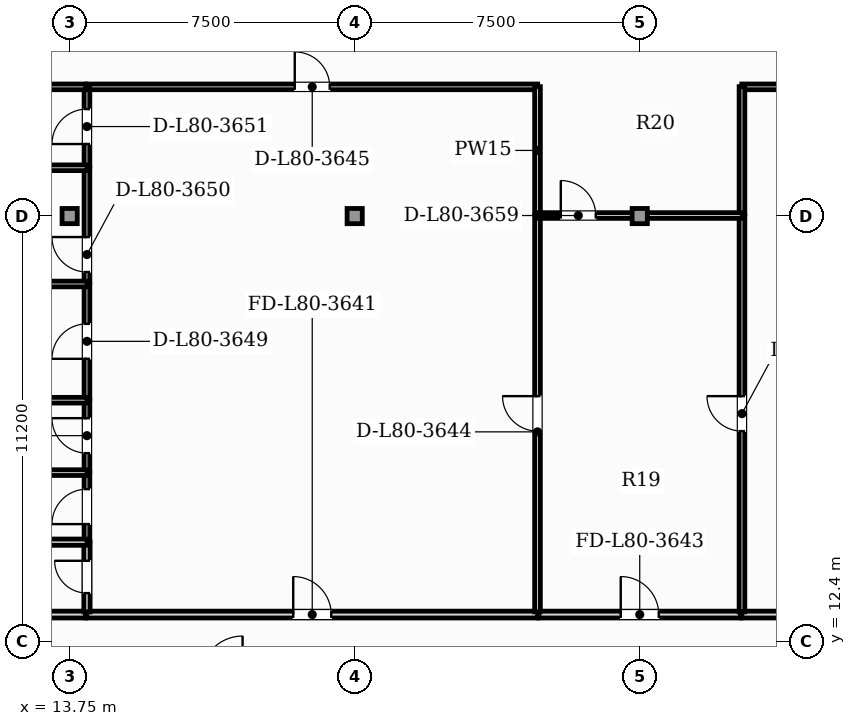
"""IFC4 building model, lengths in metres.
Left out: names, types, materials, properties, quantities, classifications, styles, units other than length and angle.
Written with IfcOpenShell. Run it as: python <this file> out.ifc"""

import sys

from ifc_helpers import new_model, si_unit, direction, frame, frame_2d, origin, origin_2d, place, context, subcontext, project, spatial, rectangle, hollow_rectangle, extrude, element, fill, save


model = new_model("IFC4")
c1 = context("Model", 3, precision=1e-05, world=origin(), true_north=direction((0.0, 1.0)))
c2 = subcontext(c1, "Body", "Model", "MODEL_VIEW")
j1 = project(units=[si_unit("LENGTHUNIT", "METRE"), si_unit("PLANEANGLEUNIT", "RADIAN")], contexts=[c1])
p1 = place(None, origin())
s1 = spatial("IfcSite", under=j1, at=p1, CompositionType="ELEMENT")
p2 = place(p1, origin())
s2 = spatial("IfcBuilding", under=s1, at=p2, CompositionType="ELEMENT")
p3 = place(p2, frame((0.0, 0.0, 324.6)))
s3 = spatial("IfcBuildingStorey", under=s2, at=p3, CompositionType="ELEMENT", Elevation=324.6)
for number, where, z_axis, x_axis in (
    (1, (13.75, 23.6, 0.0), (0.0, 0.0, 1.0), (1.0, 0.0, 0.0)),
    (2, (21.25, 23.6, 0.0), (0.0, 0.0, 1.0), (1.0, 0.0, 0.0)),
    (3, (28.75, 23.6, 0.0), (0.0, 0.0, 1.0), (1.0, 0.0, 0.0)),
):
    element("IfcColumn", number, at=place(p3, frame(where, z_axis=z_axis, x_axis=x_axis)), inside=s3, PredefinedType="COLUMN", context=c2, shape_type="SweptSolid", body=[
        extrude(hollow_rectangle(XDim=0.4, YDim=0.4, WallThickness=0.02, at=origin_2d()), origin(), (0.0, 0.0, 1.0), 3.85),
    ])
p4 = place(p3, frame((14.2, 13.115, 0.0), z_axis=(0.0, 0.0, 1.0), x_axis=(1.0, 0.0, 0.0)))
e4 = element("IfcWall", 4, at=p4, inside=s3, PredefinedType="PARTITIONING", context=c2, shape_type="SweptSolid", body=[
    extrude(rectangle(XDim=11.865, YDim=0.18, at=frame_2d((5.932, 0.0))), origin(), (0.0, 0.0, 1.0), 3.65),
])
p5 = place(p4, frame((5.432, 0.0, 0.0)))
e5 = element("IfcOpeningElement", 5, at=p5, cuts=e4, PredefinedType="OPENING", context=c2, shape_type="SweptSolid", body=[
    extrude(rectangle(XDim=1.0, YDim=2.15, at=frame_2d((0.5, 1.075))), frame((0.0, 0.1, 0.0), z_axis=(0.0, -1.0, 0.0), x_axis=(1.0, 0.0, 0.0)), (0.0, 0.0, 1.0), 0.2),
])
p6 = place(p3, frame((31.435, 13.115, 0.0), z_axis=(0.0, 0.0, 1.0), x_axis=(1.0, 0.0, 0.0)))
e6 = element("IfcWall", 6, at=p6, inside=s3, PredefinedType="PARTITIONING", context=c2, shape_type="SweptSolid", body=[
    extrude(rectangle(XDim=11.865, YDim=0.18, at=frame_2d((5.932, 0.0))), origin(), (0.0, 0.0, 1.0), 3.65),
])
p7 = place(p6, frame((5.432, 0.0, 0.0)))
e7 = element("IfcOpeningElement", 7, at=p7, cuts=e6, PredefinedType="OPENING", context=c2, shape_type="SweptSolid", body=[
    extrude(rectangle(XDim=1.0, YDim=2.15, at=frame_2d((0.5, 1.075))), frame((0.0, 0.1, 0.0), z_axis=(0.0, -1.0, 0.0), x_axis=(1.0, 0.0, 0.0)), (0.0, 0.0, 1.0), 0.2),
])
p8 = place(p3, frame((26.095, 13.115, 0.0), z_axis=(0.0, 0.0, 1.0), x_axis=(1.0, 0.0, 0.0)))
e8 = element("IfcWall", 8, at=p8, inside=s3, PredefinedType="PARTITIONING", context=c2, shape_type="SweptSolid", body=[
    extrude(rectangle(XDim=5.31, YDim=0.18, at=frame_2d((2.655, 0.0))), origin(), (0.0, 0.0, 1.0), 3.65),
])
p9 = place(p8, frame((2.155, 0.0, 0.0)))
e9 = element("IfcOpeningElement", 9, at=p9, cuts=e8, PredefinedType="OPENING", context=c2, shape_type="SweptSolid", body=[
    extrude(rectangle(XDim=1.0, YDim=2.15, at=frame_2d((0.5, 1.075))), frame((0.0, 0.1, 0.0), z_axis=(0.0, -1.0, 0.0), x_axis=(1.0, 0.0, 0.0)), (0.0, 0.0, 1.0), 0.2),
])
p10 = place(p3, frame((11.105, 13.115, 0.0), z_axis=(0.0, 0.0, 1.0), x_axis=(1.0, 0.0, 0.0)))
e10 = element("IfcWall", 10, at=p10, inside=s3, PredefinedType="PARTITIONING", context=c2, shape_type="SweptSolid", body=[
    extrude(rectangle(XDim=3.065, YDim=0.18, at=frame_2d((1.533, 0.0))), origin(), (0.0, 0.0, 1.0), 3.65),
])
p11 = place(p3, frame((26.06, 13.185, 0.0), z_axis=(0.0, 0.0, 1.0), x_axis=(0.0, 1.0, 0.0)))
e11 = element("IfcWall", 11, at=p11, inside=s3, PredefinedType="PARTITIONING", context=c2, shape_type="SweptSolid", body=[
    extrude(rectangle(XDim=10.435, YDim=0.15, at=frame_2d((5.217, 0.0))), origin(), (0.0, 0.0, 1.0), 3.65),
])
p12 = place(p11, frame((4.757, 0.0, 0.0)))
e12 = element("IfcOpeningElement", 12, at=p12, cuts=e11, PredefinedType="OPENING", context=c2, shape_type="SweptSolid", body=[
    extrude(rectangle(XDim=0.92, YDim=2.1, at=frame_2d((0.46, 1.05))), frame((0.0, 0.085, 0.0), z_axis=(0.0, -1.0, 0.0), x_axis=(1.0, 0.0, 0.0)), (0.0, 0.0, 1.0), 0.17),
])
p13 = place(p3, frame((14.2, 27.0, 0.0), z_axis=(0.0, 0.0, 1.0), x_axis=(1.0, 0.0, 0.0)))
e13 = element("IfcWall", 13, at=p13, inside=s3, PredefinedType="PARTITIONING", context=c2, shape_type="SweptSolid", body=[
    extrude(rectangle(XDim=11.865, YDim=0.15, at=frame_2d((5.932, 0.0))), origin(), (0.0, 0.0, 1.0), 3.65),
])
p14 = place(p13, frame((5.472, 0.0, 0.0)))
e14 = element("IfcOpeningElement", 14, at=p14, cuts=e13, PredefinedType="OPENING", context=c2, shape_type="SweptSolid", body=[
    extrude(rectangle(XDim=0.92, YDim=2.1, at=frame_2d((0.46, 1.05))), frame((0.0, 0.085, 0.0), z_axis=(0.0, -1.0, 0.0), x_axis=(1.0, 0.0, 0.0)), (0.0, 0.0, 1.0), 0.17),
])
p15 = place(p3, frame((26.06, 23.65, 0.0), z_axis=(0.0, 0.0, 1.0), x_axis=(0.0, 1.0, 0.0)))
e15 = element("IfcWall", 15, at=p15, inside=s3, PredefinedType="PARTITIONING", context=c2, shape_type="SweptSolid", body=[
    extrude(rectangle(XDim=3.355, YDim=0.15, at=frame_2d((1.678, 0.0))), origin(), (0.0, 0.0, 1.0), 3.65),
])
p16 = place(p3, frame((14.205, 13.185, 0.0), z_axis=(0.0, 0.0, 1.0), x_axis=(0.0, 1.0, 0.0)))
e16 = element("IfcWall", 16, at=p16, inside=s3, PredefinedType="PLUMBINGWALL", context=c2, shape_type="SweptSolid", body=[
    extrude(rectangle(XDim=1.84, YDim=0.165, at=frame_2d((0.92, 0.0))), origin(), (0.0, 0.0, 1.0), 3.65),
])
p17 = place(p16, frame((0.495, 0.0, 0.0)))
e17 = element("IfcOpeningElement", 17, at=p17, cuts=e16, PredefinedType="OPENING", context=c2, shape_type="SweptSolid", body=[
    extrude(rectangle(XDim=0.85, YDim=2.1, at=frame_2d((0.425, 1.05))), frame((0.0, 0.093, 0.0), z_axis=(0.0, -1.0, 0.0), x_axis=(1.0, 0.0, 0.0)), (0.0, 0.0, 1.0), 0.185),
])
p18 = place(p3, frame((14.205, 15.055, 0.0), z_axis=(0.0, 0.0, 1.0), x_axis=(0.0, 1.0, 0.0)))
e18 = element("IfcWall", 18, at=p18, inside=s3, PredefinedType="PARTITIONING", context=c2, shape_type="SweptSolid", body=[
    extrude(rectangle(XDim=1.8, YDim=0.15, at=frame_2d((0.9, 0.0))), origin(), (0.0, 0.0, 1.0), 3.65),
])
p19 = place(p18, frame((0.44, 0.0, 0.0)))
e19 = element("IfcOpeningElement", 19, at=p19, cuts=e18, PredefinedType="OPENING", context=c2, shape_type="SweptSolid", body=[
    extrude(rectangle(XDim=0.92, YDim=2.1, at=frame_2d((0.46, 1.05))), frame((0.0, 0.085, 0.0), z_axis=(0.0, -1.0, 0.0), x_axis=(1.0, 0.0, 0.0)), (0.0, 0.0, 1.0), 0.17),
])
p20 = place(p3, frame((14.205, 16.885, 0.0), z_axis=(0.0, 0.0, 1.0), x_axis=(0.0, 1.0, 0.0)))
e20 = element("IfcWall", 20, at=p20, inside=s3, PredefinedType="PARTITIONING", context=c2, shape_type="SweptSolid", body=[
    extrude(rectangle(XDim=1.875, YDim=0.15, at=frame_2d((0.938, 0.0))), origin(), (0.0, 0.0, 1.0), 3.65),
])
p21 = place(p20, frame((0.478, 0.0, 0.0)))
e21 = element("IfcOpeningElement", 21, at=p21, cuts=e20, PredefinedType="OPENING", context=c2, shape_type="SweptSolid", body=[
    extrude(rectangle(XDim=0.92, YDim=2.1, at=frame_2d((0.46, 1.05))), frame((0.0, 0.085, 0.0), z_axis=(0.0, -1.0, 0.0), x_axis=(1.0, 0.0, 0.0)), (0.0, 0.0, 1.0), 0.17),
])
p22 = place(p3, frame((14.205, 18.79, 0.0), z_axis=(0.0, 0.0, 1.0), x_axis=(0.0, 1.0, 0.0)))
e22 = element("IfcWall", 22, at=p22, inside=s3, PredefinedType="PARTITIONING", context=c2, shape_type="SweptSolid", body=[
    extrude(rectangle(XDim=3.028, YDim=0.15, at=frame_2d((1.514, 0.0))), origin(), (0.0, 0.0, 1.0), 3.65),
])
p23 = place(p22, frame((1.054, 0.0, 0.0)))
e23 = element("IfcOpeningElement", 23, at=p23, cuts=e22, PredefinedType="OPENING", context=c2, shape_type="SweptSolid", body=[
    extrude(rectangle(XDim=0.92, YDim=2.1, at=frame_2d((0.46, 1.05))), frame((0.0, 0.085, 0.0), z_axis=(0.0, -1.0, 0.0), x_axis=(1.0, 0.0, 0.0)), (0.0, 0.0, 1.0), 0.17),
])
p24 = place(p3, frame((14.205, 21.848, 0.0), z_axis=(0.0, 0.0, 1.0), x_axis=(0.0, 1.0, 0.0)))
e24 = element("IfcWall", 24, at=p24, inside=s3, PredefinedType="PARTITIONING", context=c2, shape_type="SweptSolid", body=[
    extrude(rectangle(XDim=3.028, YDim=0.15, at=frame_2d((1.514, 0.0))), origin(), (0.0, 0.0, 1.0), 3.65),
])
p25 = place(p24, frame((0.28, 0.0, 0.0)))
e25 = element("IfcOpeningElement", 25, at=p25, cuts=e24, PredefinedType="OPENING", context=c2, shape_type="SweptSolid", body=[
    extrude(rectangle(XDim=0.92, YDim=2.1, at=frame_2d((0.46, 1.05))), frame((0.0, 0.085, 0.0), z_axis=(0.0, -1.0, 0.0), x_axis=(1.0, 0.0, 0.0)), (0.0, 0.0, 1.0), 0.17),
])
p26 = place(p3, frame((14.205, 24.906, 0.0), z_axis=(0.0, 0.0, 1.0), x_axis=(0.0, 1.0, 0.0)))
e26 = element("IfcWall", 26, at=p26, inside=s3, PredefinedType="PARTITIONING", context=c2, shape_type="SweptSolid", body=[
    extrude(rectangle(XDim=2.099, YDim=0.15, at=frame_2d((1.049, 0.0))), origin(), (0.0, 0.0, 1.0), 3.65),
])
p27 = place(p26, frame((0.589, 0.0, 0.0)))
e27 = element("IfcOpeningElement", 27, at=p27, cuts=e26, PredefinedType="OPENING", context=c2, shape_type="SweptSolid", body=[
    extrude(rectangle(XDim=0.92, YDim=2.1, at=frame_2d((0.46, 1.05))), frame((0.0, 0.085, 0.0), z_axis=(0.0, -1.0, 0.0), x_axis=(1.0, 0.0, 0.0)), (0.0, 0.0, 1.0), 0.17),
])
p28 = place(p3, frame((31.44, 13.185, 0.0), z_axis=(0.0, 0.0, 1.0), x_axis=(0.0, 1.0, 0.0)))
e28 = element("IfcWall", 28, at=p28, inside=s3, PredefinedType="PARTITIONING", context=c2, shape_type="SweptSolid", body=[
    extrude(rectangle(XDim=10.435, YDim=0.15, at=frame_2d((5.217, 0.0))), origin(), (0.0, 0.0, 1.0), 3.65),
])
p29 = place(p28, frame((4.757, 0.0, 0.0)))
e29 = element("IfcOpeningElement", 29, at=p29, cuts=e28, PredefinedType="OPENING", context=c2, shape_type="SweptSolid", body=[
    extrude(rectangle(XDim=0.92, YDim=2.1, at=frame_2d((0.46, 1.05))), frame((0.0, 0.085, 0.0), z_axis=(0.0, -1.0, 0.0), x_axis=(1.0, 0.0, 0.0)), (0.0, 0.0, 1.0), 0.17),
])
p30 = place(p3, frame((31.435, 27.0, 0.0), z_axis=(0.0, 0.0, 1.0), x_axis=(1.0, 0.0, 0.0)))
e30 = element("IfcWall", 30, at=p30, inside=s3, PredefinedType="PARTITIONING", context=c2, shape_type="SweptSolid", body=[
    extrude(rectangle(XDim=11.865, YDim=0.15, at=frame_2d((5.932, 0.0))), origin(), (0.0, 0.0, 1.0), 3.65),
])
p31 = place(p30, frame((5.472, 0.0, 0.0)))
e31 = element("IfcOpeningElement", 31, at=p31, cuts=e30, PredefinedType="OPENING", context=c2, shape_type="SweptSolid", body=[
    extrude(rectangle(XDim=0.92, YDim=2.1, at=frame_2d((0.46, 1.05))), frame((0.0, 0.085, 0.0), z_axis=(0.0, -1.0, 0.0), x_axis=(1.0, 0.0, 0.0)), (0.0, 0.0, 1.0), 0.17),
])
p32 = place(p3, frame((31.44, 23.65, 0.0), z_axis=(0.0, 0.0, 1.0), x_axis=(0.0, 1.0, 0.0)))
e32 = element("IfcWall", 32, at=p32, inside=s3, PredefinedType="PARTITIONING", context=c2, shape_type="SweptSolid", body=[
    extrude(rectangle(XDim=3.355, YDim=0.15, at=frame_2d((1.678, 0.0))), origin(), (0.0, 0.0, 1.0), 3.65),
])
p33 = place(p3, frame((26.055, 23.615, 0.0), z_axis=(0.0, 0.0, 1.0), x_axis=(1.0, 0.0, 0.0)))
e33 = element("IfcWall", 33, at=p33, inside=s3, PredefinedType="PARTITIONING", context=c2, shape_type="SweptSolid", body=[
    extrude(rectangle(XDim=5.39, YDim=0.15, at=frame_2d((2.695, 0.0))), origin(), (0.0, 0.0, 1.0), 3.117),
])
p34 = place(p33, frame((0.618, 0.0, 0.0)))
e34 = element("IfcOpeningElement", 34, at=p34, cuts=e33, PredefinedType="OPENING", context=c2, shape_type="SweptSolid", body=[
    extrude(rectangle(XDim=0.92, YDim=2.1, at=frame_2d((0.46, 1.05))), frame((0.0, 0.085, 0.0), z_axis=(0.0, -1.0, 0.0), x_axis=(1.0, 0.0, 0.0)), (0.0, 0.0, 1.0), 0.17),
])
p35 = place(p3, frame((9.285, 27.0, 0.0), z_axis=(0.0, 0.0, 1.0), x_axis=(1.0, 0.0, 0.0)))
e35 = element("IfcWall", 35, at=p35, inside=s3, PredefinedType="PARTITIONING", context=c2, shape_type="SweptSolid", body=[
    extrude(rectangle(XDim=4.885, YDim=0.15, at=frame_2d((2.443, 0.0))), origin(), (0.0, 0.0, 1.0), 3.65),
])
p36 = place(p35, frame((1.983, 0.0, 0.0)))
e36 = element("IfcOpeningElement", 36, at=p36, cuts=e35, PredefinedType="OPENING", context=c2, shape_type="SweptSolid", body=[
    extrude(rectangle(XDim=0.92, YDim=2.1, at=frame_2d((0.46, 1.05))), frame((0.0, 0.085, 0.0), z_axis=(0.0, -1.0, 0.0), x_axis=(1.0, 0.0, 0.0)), (0.0, 0.0, 1.0), 0.17),
])
p37 = place(p3, frame((9.285, 15.02, 0.0), z_axis=(0.0, 0.0, 1.0), x_axis=(1.0, 0.0, 0.0)))
e37 = element("IfcWall", 37, at=p37, inside=s3, PredefinedType="PLUMBINGWALL", context=c2, shape_type="SweptSolid", body=[
    extrude(rectangle(XDim=4.926, YDim=0.165, at=frame_2d((2.463, 0.0))), origin(), (0.0, 0.0, 1.0), 3.65),
])
for number, where, z_axis, x_axis in (
    (38, (9.285, 16.85, 0.0), (0.0, 0.0, 1.0), (1.0, 0.0, 0.0)),
    (39, (9.285, 18.755, 0.0), (0.0, 0.0, 1.0), (1.0, 0.0, 0.0)),
    (40, (9.285, 21.813, 0.0), (0.0, 0.0, 1.0), (1.0, 0.0, 0.0)),
    (41, (9.285, 24.871, 0.0), (0.0, 0.0, 1.0), (1.0, 0.0, 0.0)),
):
    element("IfcWall", number, at=place(p3, frame(where, z_axis=z_axis, x_axis=x_axis)), inside=s3, PredefinedType="PARTITIONING", context=c2, shape_type="SweptSolid", body=[
        extrude(rectangle(XDim=4.926, YDim=0.15, at=frame_2d((2.463, 0.0))), origin(), (0.0, 0.0, 1.0), 3.65),
    ])
p38 = place(p5, origin())
e42 = element("IfcDoor", 42, at=p38, inside=s3, OperationType="SINGLE_SWING_LEFT", PredefinedType="DOOR", context=c2, shape_type="SweptSolid", body=[
    extrude(rectangle(XDim=1.0, YDim=2.15, at=frame_2d((0.5, 1.075))), frame((0.0, 0.025, 0.0), z_axis=(0.0, -1.0, 0.0), x_axis=(1.0, 0.0, 0.0)), (0.0, 0.0, 1.0), 0.05),
])
fill(e5, e42)
p39 = place(p9, origin())
e43 = element("IfcDoor", 43, at=p39, inside=s3, OperationType="SINGLE_SWING_LEFT", PredefinedType="DOOR", context=c2, shape_type="SweptSolid", body=[
    extrude(rectangle(XDim=1.0, YDim=2.15, at=frame_2d((0.5, 1.075))), frame((0.0, 0.025, 0.0), z_axis=(0.0, -1.0, 0.0), x_axis=(1.0, 0.0, 0.0)), (0.0, 0.0, 1.0), 0.05),
])
fill(e9, e43)
p40 = place(p12, origin())
e44 = element("IfcDoor", 44, at=p40, inside=s3, OperationType="SINGLE_SWING_RIGHT", PredefinedType="DOOR", context=c2, shape_type="SweptSolid", body=[
    extrude(rectangle(XDim=0.92, YDim=2.1, at=frame_2d((0.46, 1.05))), frame((0.0, 0.025, 0.0), z_axis=(0.0, -1.0, 0.0), x_axis=(1.0, 0.0, 0.0)), (0.0, 0.0, 1.0), 0.05),
])
fill(e12, e44)
p41 = place(p14, origin())
e45 = element("IfcDoor", 45, at=p41, inside=s3, OperationType="SINGLE_SWING_LEFT", PredefinedType="DOOR", context=c2, shape_type="SweptSolid", body=[
    extrude(rectangle(XDim=0.92, YDim=2.1, at=frame_2d((0.46, 1.05))), frame((0.0, 0.025, 0.0), z_axis=(0.0, -1.0, 0.0), x_axis=(1.0, 0.0, 0.0)), (0.0, 0.0, 1.0), 0.05),
])
fill(e14, e45)
p42 = place(p17, origin())
e46 = element("IfcDoor", 46, at=p42, inside=s3, OperationType="SINGLE_SWING_RIGHT", PredefinedType="DOOR", context=c2, shape_type="SweptSolid", body=[
    extrude(rectangle(XDim=0.85, YDim=2.1, at=frame_2d((0.425, 1.05))), frame((0.0, 0.025, 0.0), z_axis=(0.0, -1.0, 0.0), x_axis=(1.0, 0.0, 0.0)), (0.0, 0.0, 1.0), 0.05),
])
fill(e17, e46)
p43 = place(p19, origin())
e47 = element("IfcDoor", 47, at=p43, inside=s3, OperationType="SINGLE_SWING_LEFT", PredefinedType="DOOR", context=c2, shape_type="SweptSolid", body=[
    extrude(rectangle(XDim=0.92, YDim=2.1, at=frame_2d((0.46, 1.05))), frame((0.0, 0.025, 0.0), z_axis=(0.0, -1.0, 0.0), x_axis=(1.0, 0.0, 0.0)), (0.0, 0.0, 1.0), 0.05),
])
fill(e19, e47)
p44 = place(p21, origin())
e48 = element("IfcDoor", 48, at=p44, inside=s3, OperationType="SINGLE_SWING_RIGHT", PredefinedType="DOOR", context=c2, shape_type="SweptSolid", body=[
    extrude(rectangle(XDim=0.92, YDim=2.1, at=frame_2d((0.46, 1.05))), frame((0.0, 0.025, 0.0), z_axis=(0.0, -1.0, 0.0), x_axis=(1.0, 0.0, 0.0)), (0.0, 0.0, 1.0), 0.05),
])
fill(e21, e48)
p45 = place(p23, origin())
e49 = element("IfcDoor", 49, at=p45, inside=s3, OperationType="SINGLE_SWING_LEFT", PredefinedType="DOOR", context=c2, shape_type="SweptSolid", body=[
    extrude(rectangle(XDim=0.92, YDim=2.1, at=frame_2d((0.46, 1.05))), frame((0.0, 0.025, 0.0), z_axis=(0.0, -1.0, 0.0), x_axis=(1.0, 0.0, 0.0)), (0.0, 0.0, 1.0), 0.05),
])
fill(e23, e49)
p46 = place(p25, origin())
e50 = element("IfcDoor", 50, at=p46, inside=s3, OperationType="SINGLE_SWING_RIGHT", PredefinedType="DOOR", context=c2, shape_type="SweptSolid", body=[
    extrude(rectangle(XDim=0.92, YDim=2.1, at=frame_2d((0.46, 1.05))), frame((0.0, 0.025, 0.0), z_axis=(0.0, -1.0, 0.0), x_axis=(1.0, 0.0, 0.0)), (0.0, 0.0, 1.0), 0.05),
])
fill(e25, e50)
p47 = place(p27, origin())
e51 = element("IfcDoor", 51, at=p47, inside=s3, OperationType="SINGLE_SWING_LEFT", PredefinedType="DOOR", context=c2, shape_type="SweptSolid", body=[
    extrude(rectangle(XDim=0.92, YDim=2.1, at=frame_2d((0.46, 1.05))), frame((0.0, 0.025, 0.0), z_axis=(0.0, -1.0, 0.0), x_axis=(1.0, 0.0, 0.0)), (0.0, 0.0, 1.0), 0.05),
])
fill(e27, e51)
p48 = place(p29, origin())
e52 = element("IfcDoor", 52, at=p48, inside=s3, OperationType="SINGLE_SWING_RIGHT", PredefinedType="DOOR", context=c2, shape_type="SweptSolid", body=[
    extrude(rectangle(XDim=0.92, YDim=2.1, at=frame_2d((0.46, 1.05))), frame((0.0, 0.025, 0.0), z_axis=(0.0, -1.0, 0.0), x_axis=(1.0, 0.0, 0.0)), (0.0, 0.0, 1.0), 0.05),
])
fill(e29, e52)
p49 = place(p34, origin())
e53 = element("IfcDoor", 53, at=p49, inside=s3, OperationType="SINGLE_SWING_LEFT", PredefinedType="DOOR", context=c2, shape_type="SweptSolid", body=[
    extrude(rectangle(XDim=0.92, YDim=2.1, at=frame_2d((0.46, 1.05))), frame((0.0, 0.025, 0.0), z_axis=(0.0, -1.0, 0.0), x_axis=(1.0, 0.0, 0.0)), (0.0, 0.0, 1.0), 0.05),
])
fill(e34, e53)
save(model, sys.argv[1])
